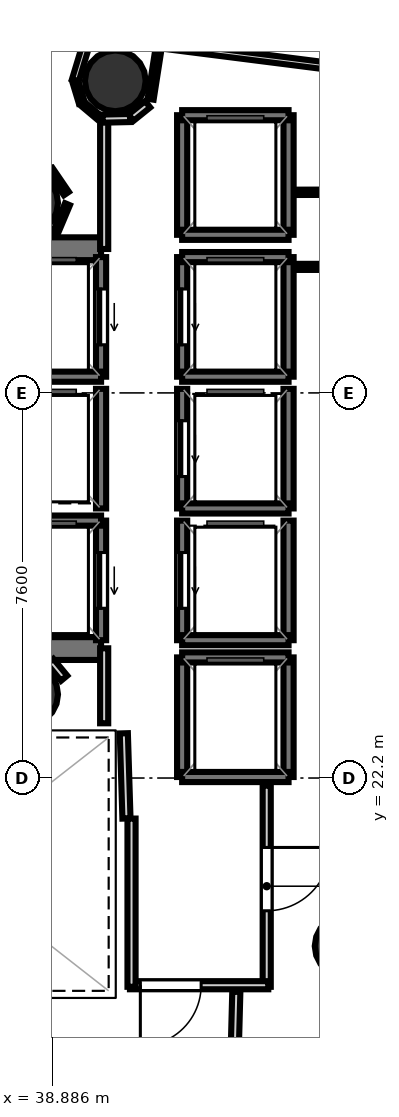
"""IFC4 building model, lengths in metres.
Left out: names, types, materials, properties, quantities, classifications, styles, units other than length and angle.
Written with IfcOpenShell. Run it as: python <this file> out.ifc"""

import sys

from ifc_helpers import new_model, si_unit, direction, frame, frame_2d, origin, origin_2d, place, context, subcontext, project, spatial, rectangle, hollow_circle, extrude, element, fill, save


model = new_model("IFC4")
c1 = context("Model", 3, precision=1e-05, world=origin(), true_north=direction((0.0, 1.0)))
c2 = subcontext(c1, "Body", "Model", "MODEL_VIEW")
j1 = project(units=[si_unit("LENGTHUNIT", "METRE"), si_unit("PLANEANGLEUNIT", "RADIAN")], contexts=[c1])
p1 = place(None, origin())
s1 = spatial("IfcSite", under=j1, at=p1, CompositionType="ELEMENT")
p2 = place(p1, origin())
s2 = spatial("IfcBuilding", under=s1, at=p2, CompositionType="ELEMENT")
p3 = place(p2, frame((0.0, 0.0, 218.8)))
s3 = spatial("IfcBuildingStorey", under=s2, at=p3, CompositionType="ELEMENT", Elevation=218.8)
p4 = place(p3, frame((29.33, 32.645, 0.0), z_axis=(0.0, 0.0, 1.0), x_axis=(1.0, 0.0, 0.0)))
e1 = element("IfcWall", 1, at=p4, inside=s3, PredefinedType="SHEAR", context=c2, shape_type="SweptSolid", body=[
    extrude(rectangle(XDim=10.52, YDim=0.45, at=frame_2d((5.26, 0.0))), origin(), (0.0, 0.0, 1.0), 3.52),
])
p5 = place(p4, frame((0.895, 0.0, 0.0)))
e2 = element("IfcOpeningElement", 2, at=p5, cuts=e1, PredefinedType="OPENING", context=c2, shape_type="SweptSolid", body=[
    extrude(rectangle(XDim=1.25, YDim=2.15, at=frame_2d((0.625, 1.075))), frame((0.0, 0.235, 0.0), z_axis=(0.0, -1.0, 0.0), x_axis=(1.0, 0.0, 0.0)), (0.0, 0.0, 1.0), 0.47),
])
p6 = place(p3, frame((29.33, 24.755, 0.0), z_axis=(0.0, 0.0, 1.0), x_axis=(1.0, 0.0, 0.0)))
e3 = element("IfcWall", 3, at=p6, inside=s3, PredefinedType="SHEAR", context=c2, shape_type="SweptSolid", body=[
    extrude(rectangle(XDim=10.52, YDim=0.45, at=frame_2d((5.26, 0.0))), origin(), (0.0, 0.0, 1.0), 3.52),
])
p7 = place(p6, frame((0.695, 0.0, 0.0)))
e4 = element("IfcOpeningElement", 4, at=p7, cuts=e3, PredefinedType="OPENING", context=c2, shape_type="SweptSolid", body=[
    extrude(rectangle(XDim=1.25, YDim=2.15, at=frame_2d((0.625, 1.075))), frame((0.0, 0.235, 0.0), z_axis=(0.0, -1.0, 0.0), x_axis=(1.0, 0.0, 0.0)), (0.0, 0.0, 1.0), 0.47),
])
for number, where, z_axis, x_axis in (
    (5, (38.4, 33.55, 0.0), (0.0, 0.0, 1.0), (1.0, 0.0, 0.0)),
    (6, (38.4, 23.85, 0.0), (0.0, 0.0, 1.0), (1.0, 0.0, 0.0)),
    (7, (40.131, 35.958, 0.0), (0.0, 0.0, 1.0), (1.0, 0.0, 0.0)),
    (8, (44.667, 18.883, 0.0), (0.0, 0.0, 1.0), (1.0, 0.0, 0.0)),
):
    element("IfcColumn", number, at=place(p3, frame(where, z_axis=z_axis, x_axis=x_axis)), inside=s3, PredefinedType="COLUMN", context=c2, shape_type="SweptSolid", body=[
        extrude(hollow_circle(Radius=0.6, WallThickness=0.03, at=origin_2d()), origin(), (0.0, 0.0, 1.0), 3.7),
    ])
p8 = place(p3, frame((39.85, 30.12, 0.0), z_axis=(0.0, 0.0, 1.0), x_axis=(0.0, 1.0, 0.0)))
e9 = element("IfcWall", 9, at=p8, inside=s3, PredefinedType="SOLIDWALL", context=c2, shape_type="SweptSolid", body=[
    extrude(rectangle(XDim=2.36, YDim=0.2, at=frame_2d((1.18, 0.0))), origin(), (0.0, 0.0, 1.0), 3.52),
])
p9 = place(p8, frame((0.63, 0.0, 0.0)))
e10 = element("IfcOpeningElement", 10, at=p9, cuts=e9, PredefinedType="OPENING", context=c2, shape_type="SweptSolid", body=[
    extrude(rectangle(XDim=1.1, YDim=2.15, at=frame_2d((0.55, 1.075))), frame((0.0, 0.11, 0.0), z_axis=(0.0, -1.0, 0.0), x_axis=(1.0, 0.0, 0.0)), (0.0, 0.0, 1.0), 0.22),
])
p10 = place(p3, frame((37.75, 30.12, 0.0), z_axis=(0.0, 0.0, 1.0), x_axis=(1.0, 0.0, 0.0)))
e11 = element("IfcWall", 11, at=p10, inside=s3, PredefinedType="SOLIDWALL", context=c2, shape_type="SweptSolid", body=[
    extrude(rectangle(XDim=2.1, YDim=0.2, at=frame_2d((1.05, 0.0))), origin(), (0.0, 0.0, 1.0), 3.52),
])
p11 = place(p3, frame((39.85, 24.92, 0.0), z_axis=(0.0, 0.0, 1.0), x_axis=(0.0, 1.0, 0.0)))
e12 = element("IfcWall", 12, at=p11, inside=s3, PredefinedType="SOLIDWALL", context=c2, shape_type="SweptSolid", body=[
    extrude(rectangle(XDim=2.36, YDim=0.2, at=frame_2d((1.18, 0.0))), origin(), (0.0, 0.0, 1.0), 3.52),
])
p12 = place(p11, frame((0.63, 0.0, 0.0)))
e13 = element("IfcOpeningElement", 13, at=p12, cuts=e12, PredefinedType="OPENING", context=c2, shape_type="SweptSolid", body=[
    extrude(rectangle(XDim=1.1, YDim=2.15, at=frame_2d((0.55, 1.075))), frame((0.0, 0.11, 0.0), z_axis=(0.0, -1.0, 0.0), x_axis=(1.0, 0.0, 0.0)), (0.0, 0.0, 1.0), 0.22),
])
p13 = place(p3, frame((37.75, 27.28, 0.0), z_axis=(0.0, 0.0, 1.0), x_axis=(1.0, 0.0, 0.0)))
e14 = element("IfcWall", 14, at=p13, inside=s3, PredefinedType="SOLIDWALL", context=c2, shape_type="SweptSolid", body=[
    extrude(rectangle(XDim=2.1, YDim=0.2, at=frame_2d((1.05, 0.0))), origin(), (0.0, 0.0, 1.0), 3.52),
])
p14 = place(p3, frame((43.55, 30.12, 0.0), z_axis=(0.0, 0.0, 1.0), x_axis=(0.0, 1.0, 0.0)))
e15 = element("IfcWall", 15, at=p14, inside=s3, PredefinedType="SOLIDWALL", context=c2, shape_type="SweptSolid", body=[
    extrude(rectangle(XDim=2.36, YDim=0.2, at=frame_2d((1.18, 0.0))), origin(), (0.0, 0.0, 1.0), 3.52),
])
p15 = place(p3, frame((41.45, 30.12, 0.0), z_axis=(0.0, 0.0, 1.0), x_axis=(0.0, 1.0, 0.0)))
e16 = element("IfcWall", 16, at=p15, inside=s3, PredefinedType="SOLIDWALL", context=c2, shape_type="SweptSolid", body=[
    extrude(rectangle(XDim=2.36, YDim=0.2, at=frame_2d((1.18, 0.0))), origin(), (0.0, 0.0, 1.0), 3.52),
])
p16 = place(p15, frame((0.63, 0.0, 0.0)))
e17 = element("IfcOpeningElement", 17, at=p16, cuts=e16, PredefinedType="OPENING", context=c2, shape_type="SweptSolid", body=[
    extrude(rectangle(XDim=1.1, YDim=2.15, at=frame_2d((0.55, 1.075))), frame((0.0, 0.11, 0.0), z_axis=(0.0, -1.0, 0.0), x_axis=(1.0, 0.0, 0.0)), (0.0, 0.0, 1.0), 0.22),
])
for number, where, z_axis, x_axis in (
    (18, (41.45, 32.48, 0.0), (0.0, 0.0, 1.0), (1.0, 0.0, 0.0)),
    (19, (41.45, 30.12, 0.0), (0.0, 0.0, 1.0), (1.0, 0.0, 0.0)),
):
    element("IfcWall", number, at=place(p3, frame(where, z_axis=z_axis, x_axis=x_axis)), inside=s3, PredefinedType="SOLIDWALL", context=c2, shape_type="SweptSolid", body=[
        extrude(rectangle(XDim=2.1, YDim=0.2, at=frame_2d((1.05, 0.0))), origin(), (0.0, 0.0, 1.0), 3.52),
    ])
p17 = place(p3, frame((43.55, 27.52, 0.0), z_axis=(0.0, 0.0, 1.0), x_axis=(0.0, 1.0, 0.0)))
e20 = element("IfcWall", 20, at=p17, inside=s3, PredefinedType="SOLIDWALL", context=c2, shape_type="SweptSolid", body=[
    extrude(rectangle(XDim=2.36, YDim=0.2, at=frame_2d((1.18, 0.0))), origin(), (0.0, 0.0, 1.0), 3.52),
])
p18 = place(p3, frame((41.45, 27.52, 0.0), z_axis=(0.0, 0.0, 1.0), x_axis=(0.0, 1.0, 0.0)))
e21 = element("IfcWall", 21, at=p18, inside=s3, PredefinedType="SOLIDWALL", context=c2, shape_type="SweptSolid", body=[
    extrude(rectangle(XDim=2.36, YDim=0.2, at=frame_2d((1.18, 0.0))), origin(), (0.0, 0.0, 1.0), 3.52),
])
p19 = place(p18, frame((0.63, 0.0, 0.0)))
e22 = element("IfcOpeningElement", 22, at=p19, cuts=e21, PredefinedType="OPENING", context=c2, shape_type="SweptSolid", body=[
    extrude(rectangle(XDim=1.1, YDim=2.15, at=frame_2d((0.55, 1.075))), frame((0.0, 0.11, 0.0), z_axis=(0.0, -1.0, 0.0), x_axis=(1.0, 0.0, 0.0)), (0.0, 0.0, 1.0), 0.22),
])
p20 = place(p3, frame((41.45, 27.52, 0.0), z_axis=(0.0, 0.0, 1.0), x_axis=(1.0, 0.0, 0.0)))
e23 = element("IfcWall", 23, at=p20, inside=s3, PredefinedType="SOLIDWALL", context=c2, shape_type="SweptSolid", body=[
    extrude(rectangle(XDim=2.1, YDim=0.2, at=frame_2d((1.05, 0.0))), origin(), (0.0, 0.0, 1.0), 3.52),
])
p21 = place(p3, frame((43.55, 24.92, 0.0), z_axis=(0.0, 0.0, 1.0), x_axis=(0.0, 1.0, 0.0)))
e24 = element("IfcWall", 24, at=p21, inside=s3, PredefinedType="SOLIDWALL", context=c2, shape_type="SweptSolid", body=[
    extrude(rectangle(XDim=2.36, YDim=0.2, at=frame_2d((1.18, 0.0))), origin(), (0.0, 0.0, 1.0), 3.52),
])
p22 = place(p3, frame((41.45, 24.92, 0.0), z_axis=(0.0, 0.0, 1.0), x_axis=(0.0, 1.0, 0.0)))
e25 = element("IfcWall", 25, at=p22, inside=s3, PredefinedType="SOLIDWALL", context=c2, shape_type="SweptSolid", body=[
    extrude(rectangle(XDim=2.36, YDim=0.2, at=frame_2d((1.18, 0.0))), origin(), (0.0, 0.0, 1.0), 3.52),
])
p23 = place(p22, frame((0.63, 0.0, 0.0)))
e26 = element("IfcOpeningElement", 26, at=p23, cuts=e25, PredefinedType="OPENING", context=c2, shape_type="SweptSolid", body=[
    extrude(rectangle(XDim=1.1, YDim=2.15, at=frame_2d((0.55, 1.075))), frame((0.0, 0.11, 0.0), z_axis=(0.0, -1.0, 0.0), x_axis=(1.0, 0.0, 0.0)), (0.0, 0.0, 1.0), 0.22),
])
p24 = place(p3, frame((41.45, 24.92, 0.0), z_axis=(0.0, 0.0, 1.0), x_axis=(1.0, 0.0, 0.0)))
e27 = element("IfcWall", 27, at=p24, inside=s3, PredefinedType="SOLIDWALL", context=c2, shape_type="SweptSolid", body=[
    extrude(rectangle(XDim=2.1, YDim=0.2, at=frame_2d((1.05, 0.0))), origin(), (0.0, 0.0, 1.0), 3.52),
])
p25 = place(p3, frame((39.85, 27.52, 0.0), z_axis=(0.0, 0.0, 1.0), x_axis=(0.0, 1.0, 0.0)))
e28 = element("IfcWall", 28, at=p25, inside=s3, PredefinedType="SOLIDWALL", context=c2, shape_type="SweptSolid", body=[
    extrude(rectangle(XDim=2.36, YDim=0.2, at=frame_2d((1.18, 0.0))), origin(), (0.0, 0.0, 1.0), 3.52),
])
for number, where, z_axis, x_axis in (
    (29, (43.55, 22.22, 0.0), (0.0, 0.0, 1.0), (0.0, 1.0, 0.0)),
    (30, (41.45, 22.22, 0.0), (0.0, 0.0, 1.0), (0.0, 1.0, 0.0)),
):
    element("IfcWall", number, at=place(p3, frame(where, z_axis=z_axis, x_axis=x_axis)), inside=s3, PredefinedType="SOLIDWALL", context=c2, shape_type="SweptSolid", body=[
        extrude(rectangle(XDim=2.36, YDim=0.2, at=frame_2d((1.18, 0.0))), origin(), (0.0, 0.0, 1.0), 3.52),
    ])
for number, where, z_axis, x_axis in (
    (31, (41.45, 24.58, 0.0), (0.0, 0.0, 1.0), (1.0, 0.0, 0.0)),
    (32, (41.45, 22.22, 0.0), (0.0, 0.0, 1.0), (1.0, 0.0, 0.0)),
):
    element("IfcWall", number, at=place(p3, frame(where, z_axis=z_axis, x_axis=x_axis)), inside=s3, PredefinedType="SOLIDWALL", context=c2, shape_type="SweptSolid", body=[
        extrude(rectangle(XDim=2.1, YDim=0.2, at=frame_2d((1.05, 0.0))), origin(), (0.0, 0.0, 1.0), 3.52),
    ])
for number, where, z_axis, x_axis in (
    (33, (43.55, 32.92, 0.0), (0.0, 0.0, 1.0), (0.0, 1.0, 0.0)),
    (34, (41.45, 32.92, 0.0), (0.0, 0.0, 1.0), (0.0, 1.0, 0.0)),
):
    element("IfcWall", number, at=place(p3, frame(where, z_axis=z_axis, x_axis=x_axis)), inside=s3, PredefinedType="SOLIDWALL", context=c2, shape_type="SweptSolid", body=[
        extrude(rectangle(XDim=2.36, YDim=0.2, at=frame_2d((1.18, 0.0))), origin(), (0.0, 0.0, 1.0), 3.52),
    ])
for number, where, z_axis, x_axis in (
    (35, (41.45, 35.28, 0.0), (0.0, 0.0, 1.0), (1.0, 0.0, 0.0)),
    (36, (41.45, 32.92, 0.0), (0.0, 0.0, 1.0), (1.0, 0.0, 0.0)),
):
    element("IfcWall", number, at=place(p3, frame(where, z_axis=z_axis, x_axis=x_axis)), inside=s3, PredefinedType="SOLIDWALL", context=c2, shape_type="SweptSolid", body=[
        extrude(rectangle(XDim=2.1, YDim=0.2, at=frame_2d((1.05, 0.0))), origin(), (0.0, 0.0, 1.0), 3.52),
    ])
p26 = place(p3, frame((40.351, 21.401, 0.0), z_axis=(0.0, 0.0, 1.0), x_axis=(-0.031058045979, 0.999517582527, 0.0)))
e37 = element("IfcWall", 37, at=p26, inside=s3, PredefinedType="PARTITIONING", context=c2, shape_type="SweptSolid", body=[
    extrude(rectangle(XDim=1.682, YDim=0.16, at=frame_2d((0.841, 0.0))), origin(), (0.0, 0.0, 1.0), 2.84),
])
p27 = place(p3, frame((39.911, 23.28, 0.0), z_axis=(0.0, 0.0, 1.0), x_axis=(0.0, 1.0, 0.0)))
e38 = element("IfcWall", 38, at=p27, inside=s3, PredefinedType="PARTITIONING", context=c2, shape_type="SweptSolid", body=[
    extrude(rectangle(XDim=1.48, YDim=0.16, at=frame_2d((0.74, 0.0))), origin(), (0.0, 0.0, 1.0), 2.84),
])
p28 = place(p3, frame((39.911, 32.64, 0.0), z_axis=(0.0, 0.0, 1.0), x_axis=(0.0, 1.0, 0.0)))
e39 = element("IfcWall", 39, at=p28, inside=s3, PredefinedType="PARTITIONING", context=c2, shape_type="SweptSolid", body=[
    extrude(rectangle(XDim=2.604, YDim=0.16, at=frame_2d((1.302, 0.0))), origin(), (0.0, 0.0, 1.0), 2.84),
])
p29 = place(p3, frame((39.881, 35.213, 0.0), z_axis=(0.0, 0.0, 1.0), x_axis=(0.999756500784, 0.02206669754, 0.0)))
e40 = element("IfcWall", 40, at=p29, inside=s3, PredefinedType="PARTITIONING", context=c2, shape_type="SweptSolid", body=[
    extrude(rectangle(XDim=0.542, YDim=0.16, at=frame_2d((0.271, 0.0))), origin(), (0.0, 0.0, 1.0), 2.84),
])
p30 = place(p3, frame((40.441, 35.232, 0.0), z_axis=(0.0, 0.0, 1.0), x_axis=(0.778714564707, 0.627378376033, 0.0)))
e41 = element("IfcWall", 41, at=p30, inside=s3, PredefinedType="PARTITIONING", context=c2, shape_type="SweptSolid", body=[
    extrude(rectangle(XDim=0.421, YDim=0.16, at=frame_2d((0.21, 0.0))), origin(), (0.0, 0.0, 1.0), 2.84),
])
p31 = place(p3, frame((43.119, 22.05, 0.0), z_axis=(0.0, 0.0, 1.0), x_axis=(0.0, -1.0, 0.0)))
e42 = element("IfcWall", 42, at=p31, inside=s3, PredefinedType="PARTITIONING", context=c2, shape_type="SweptSolid", body=[
    extrude(rectangle(XDim=3.97, YDim=0.16, at=frame_2d((1.985, 0.0))), origin(), (0.0, 0.0, 1.0), 2.84),
])
p32 = place(p31, frame((1.22, 0.0, 0.0)))
e43 = element("IfcOpeningElement", 43, at=p32, cuts=e42, PredefinedType="OPENING", context=c2, shape_type="SweptSolid", body=[
    extrude(rectangle(XDim=1.25, YDim=2.2, at=frame_2d((0.625, 1.1))), frame((0.0, 0.09, 0.0), z_axis=(0.0, -1.0, 0.0), x_axis=(1.0, 0.0, 0.0)), (0.0, 0.0, 1.0), 0.18),
])
p33 = place(p3, frame((43.15, 18.111, 0.0), z_axis=(0.0, 0.0, 1.0), x_axis=(-1.0, 0.0, 0.0)))
e44 = element("IfcWall", 44, at=p33, inside=s3, PredefinedType="PARTITIONING", context=c2, shape_type="SweptSolid", body=[
    extrude(rectangle(XDim=2.73, YDim=0.16, at=frame_2d((1.365, 0.0))), origin(), (0.0, 0.0, 1.0), 2.84),
])
p34 = place(p33, frame((1.325, 0.0, 0.0)))
e45 = element("IfcOpeningElement", 45, at=p34, cuts=e44, PredefinedType="OPENING", context=c2, shape_type="SweptSolid", body=[
    extrude(rectangle(XDim=1.2, YDim=2.15, at=frame_2d((0.6, 1.075))), frame((0.0, 0.09, 0.0), z_axis=(0.0, -1.0, 0.0), x_axis=(1.0, 0.0, 0.0)), (0.0, 0.0, 1.0), 0.18),
])
p35 = place(p3, frame((40.451, 18.08, 0.0), z_axis=(0.0, 0.0, 1.0), x_axis=(0.0, 1.0, 0.0)))
e46 = element("IfcWall", 46, at=p35, inside=s3, PredefinedType="PARTITIONING", context=c2, shape_type="SweptSolid", body=[
    extrude(rectangle(XDim=3.32, YDim=0.16, at=frame_2d((1.66, 0.0))), origin(), (0.0, 0.0, 1.0), 2.84),
])
p36 = place(p3, frame((39.121, 24.17, 0.0), z_axis=(0.0, 0.0, 1.0), x_axis=(-0.638008265708, 0.770029514296, 0.0)))
e47 = element("IfcWall", 47, at=p36, inside=s3, PredefinedType="PARTITIONING", context=c2, shape_type="SweptSolid", body=[
    extrude(rectangle(XDim=0.431, YDim=0.16, at=frame_2d((0.215, 0.0))), origin(), (0.0, 0.0, 1.0), 2.84),
])
p37 = place(p3, frame((42.519, 17.981, 0.0), z_axis=(0.0, 0.0, 1.0), x_axis=(-0.026620353414, -0.999645615598, 0.0)))
e48 = element("IfcWall", 48, at=p37, inside=s3, PredefinedType="PARTITIONING", context=c2, shape_type="SweptSolid", body=[
    extrude(rectangle(XDim=3.091, YDim=0.16, at=frame_2d((1.545, 0.0))), origin(), (0.0, 0.0, 1.0), 2.84),
])
p38 = place(p3, frame((43.72, 32.287, 0.0), z_axis=(0.0, 0.0, 1.0), x_axis=(1.0, 0.0, 0.0)))
e49 = element("IfcWall", 49, at=p38, inside=s3, PredefinedType="PARTITIONING", context=c2, shape_type="SweptSolid", body=[
    extrude(rectangle(XDim=2.385, YDim=0.12, at=frame_2d((1.192, 0.0))), origin(), (0.0, 0.0, 1.0), 2.84),
])
p39 = place(p3, frame((40.828, 35.595, 0.0), z_axis=(0.0, 0.0, 1.0), x_axis=(0.154475519744, 0.98799661629, 0.0)))
e50 = element("IfcWall", 50, at=p39, inside=s3, PredefinedType="PARTITIONING", context=c2, shape_type="SweptSolid", body=[
    extrude(rectangle(XDim=1.661, YDim=0.12, at=frame_2d((0.831, 0.0))), origin(), (0.0, 0.0, 1.0), 2.84),
])
p40 = place(p3, frame((39.777, 37.402, 0.0), z_axis=(0.0, 0.0, 1.0), x_axis=(-0.290273972187, -0.956943583014, 0.0)))
e51 = element("IfcWall", 51, at=p40, inside=s3, PredefinedType="PARTITIONING", context=c2, shape_type="SweptSolid", body=[
    extrude(rectangle(XDim=1.5, YDim=0.14, at=frame_2d((0.75, 0.0))), origin(), (0.0, 0.0, 1.0), 2.84),
])
p41 = place(p3, frame((39.341, 35.949, 0.0), z_axis=(0.0, 0.0, 1.0), x_axis=(0.290544943199, -0.956861346268, 0.0)))
e52 = element("IfcWall", 52, at=p41, inside=s3, PredefinedType="PARTITIONING", context=c2, shape_type="SweptSolid", body=[
    extrude(rectangle(XDim=0.441, YDim=0.12, at=frame_2d((0.221, 0.0))), origin(), (0.0, 0.0, 1.0), 2.84),
])
p42 = place(p3, frame((39.479, 35.512, 0.0), z_axis=(0.0, 0.0, 1.0), x_axis=(0.764834909506, -0.644226327622, 0.0)))
e53 = element("IfcWall", 53, at=p42, inside=s3, PredefinedType="PARTITIONING", context=c2, shape_type="SweptSolid", body=[
    extrude(rectangle(XDim=0.415, YDim=0.105, at=frame_2d((0.208, 0.0))), origin(), (0.0, 0.0, 1.0), 2.84),
])
p43 = place(p3, frame((39.166, 33.733, 0.0), z_axis=(0.0, 0.0, 1.0), x_axis=(-0.563162199293, 0.826346378517, 0.0)))
e54 = element("IfcWall", 54, at=p43, inside=s3, PredefinedType="PARTITIONING", context=c2, shape_type="SweptSolid", body=[
    extrude(rectangle(XDim=0.564, YDim=0.12, at=frame_2d((0.282, 0.0))), origin(), (0.0, 0.0, 1.0), 2.84),
])
p44 = place(p3, frame((38.645, 32.858, 0.0), z_axis=(0.0, 0.0, 1.0), x_axis=(0.923908393326, 0.382613748761, 0.0)))
e55 = element("IfcWall", 55, at=p44, inside=s3, PredefinedType="PARTITIONING", context=c2, shape_type="SweptSolid", body=[
    extrude(rectangle(XDim=0.329, YDim=0.12, at=frame_2d((0.165, 0.0))), origin(), (0.0, 0.0, 1.0), 2.84),
])
p45 = place(p3, frame((38.966, 33.0, 0.0), z_axis=(0.0, 0.0, 1.0), x_axis=(0.389247517771, 0.921133198788, 0.0)))
e56 = element("IfcWall", 56, at=p45, inside=s3, PredefinedType="PARTITIONING", context=c2, shape_type="SweptSolid", body=[
    extrude(rectangle(XDim=0.568, YDim=0.105, at=frame_2d((0.284, 0.0))), origin(), (0.0, 0.0, 1.0), 2.84),
])
p46 = place(p3, frame((37.226, 37.15, 0.0), z_axis=(0.0, 0.0, 1.0), x_axis=(0.992042774502, -0.125901284976, 0.0)))
e57 = element("IfcWall", 57, at=p46, inside=s3, PredefinedType="PARTITIONING", context=c2, shape_type="SweptSolid", body=[
    extrude(rectangle(XDim=8.885, YDim=0.14, at=frame_2d((4.443, 0.0))), origin(), (0.0, 0.0, 1.0), 2.84),
])
p47 = place(p3, frame((46.043, 33.764, 0.0), z_axis=(0.0, 0.0, 1.0), x_axis=(-0.999996819601, -0.002522060075, 0.0)))
e58 = element("IfcWall", 58, at=p47, inside=s3, PredefinedType="PARTITIONING", context=c2, shape_type="SweptSolid", body=[
    extrude(rectangle(XDim=2.323, YDim=0.105, at=frame_2d((1.162, 0.0))), origin(), (0.0, 0.0, 1.0), 2.84),
])
p48 = place(p9, origin())
e59 = element("IfcDoor", 59, at=p48, inside=s3, OperationType="SLIDING_TO_LEFT", PredefinedType="DOOR", context=c2, shape_type="SweptSolid", body=[
    extrude(rectangle(XDim=1.1, YDim=2.15, at=frame_2d((0.55, 1.075))), frame((0.0, 0.025, 0.0), z_axis=(0.0, -1.0, 0.0), x_axis=(1.0, 0.0, 0.0)), (0.0, 0.0, 1.0), 0.05),
])
fill(e10, e59)
p49 = place(p12, origin())
e60 = element("IfcDoor", 60, at=p49, inside=s3, OperationType="SLIDING_TO_LEFT", PredefinedType="DOOR", context=c2, shape_type="SweptSolid", body=[
    extrude(rectangle(XDim=1.1, YDim=2.15, at=frame_2d((0.55, 1.075))), frame((0.0, 0.025, 0.0), z_axis=(0.0, -1.0, 0.0), x_axis=(1.0, 0.0, 0.0)), (0.0, 0.0, 1.0), 0.05),
])
fill(e13, e60)
p50 = place(p16, origin())
e61 = element("IfcDoor", 61, at=p50, inside=s3, OperationType="SLIDING_TO_LEFT", PredefinedType="DOOR", context=c2, shape_type="SweptSolid", body=[
    extrude(rectangle(XDim=1.1, YDim=2.15, at=frame_2d((0.55, 1.075))), frame((0.0, 0.025, 0.0), z_axis=(0.0, -1.0, 0.0), x_axis=(1.0, 0.0, 0.0)), (0.0, 0.0, 1.0), 0.05),
])
fill(e17, e61)
p51 = place(p19, origin())
e62 = element("IfcDoor", 62, at=p51, inside=s3, OperationType="SLIDING_TO_LEFT", PredefinedType="DOOR", context=c2, shape_type="SweptSolid", body=[
    extrude(rectangle(XDim=1.1, YDim=2.15, at=frame_2d((0.55, 1.075))), frame((0.0, 0.025, 0.0), z_axis=(0.0, -1.0, 0.0), x_axis=(1.0, 0.0, 0.0)), (0.0, 0.0, 1.0), 0.05),
])
fill(e22, e62)
p52 = place(p23, origin())
e63 = element("IfcDoor", 63, at=p52, inside=s3, OperationType="SLIDING_TO_LEFT", PredefinedType="DOOR", context=c2, shape_type="SweptSolid", body=[
    extrude(rectangle(XDim=1.1, YDim=2.15, at=frame_2d((0.55, 1.075))), frame((0.0, 0.025, 0.0), z_axis=(0.0, -1.0, 0.0), x_axis=(1.0, 0.0, 0.0)), (0.0, 0.0, 1.0), 0.05),
])
fill(e26, e63)
p53 = place(p34, origin())
e64 = element("IfcDoor", 64, at=p53, inside=s3, OperationType="SINGLE_SWING_RIGHT", PredefinedType="DOOR", context=c2, shape_type="SweptSolid", body=[
    extrude(rectangle(XDim=1.2, YDim=2.15, at=frame_2d((0.6, 1.075))), frame((0.0, 0.025, 0.0), z_axis=(0.0, -1.0, 0.0), x_axis=(1.0, 0.0, 0.0)), (0.0, 0.0, 1.0), 0.05),
])
fill(e45, e64)
p54 = place(p32, origin())
e65 = element("IfcDoor", 65, at=p54, inside=s3, OperationType="SINGLE_SWING_LEFT", PredefinedType="DOOR", context=c2, shape_type="SweptSolid", body=[
    extrude(rectangle(XDim=1.25, YDim=2.2, at=frame_2d((0.625, 1.1))), frame((0.0, 0.025, 0.0), z_axis=(0.0, -1.0, 0.0), x_axis=(1.0, 0.0, 0.0)), (0.0, 0.0, 1.0), 0.05),
])
fill(e43, e65)
save(model, sys.argv[1])
